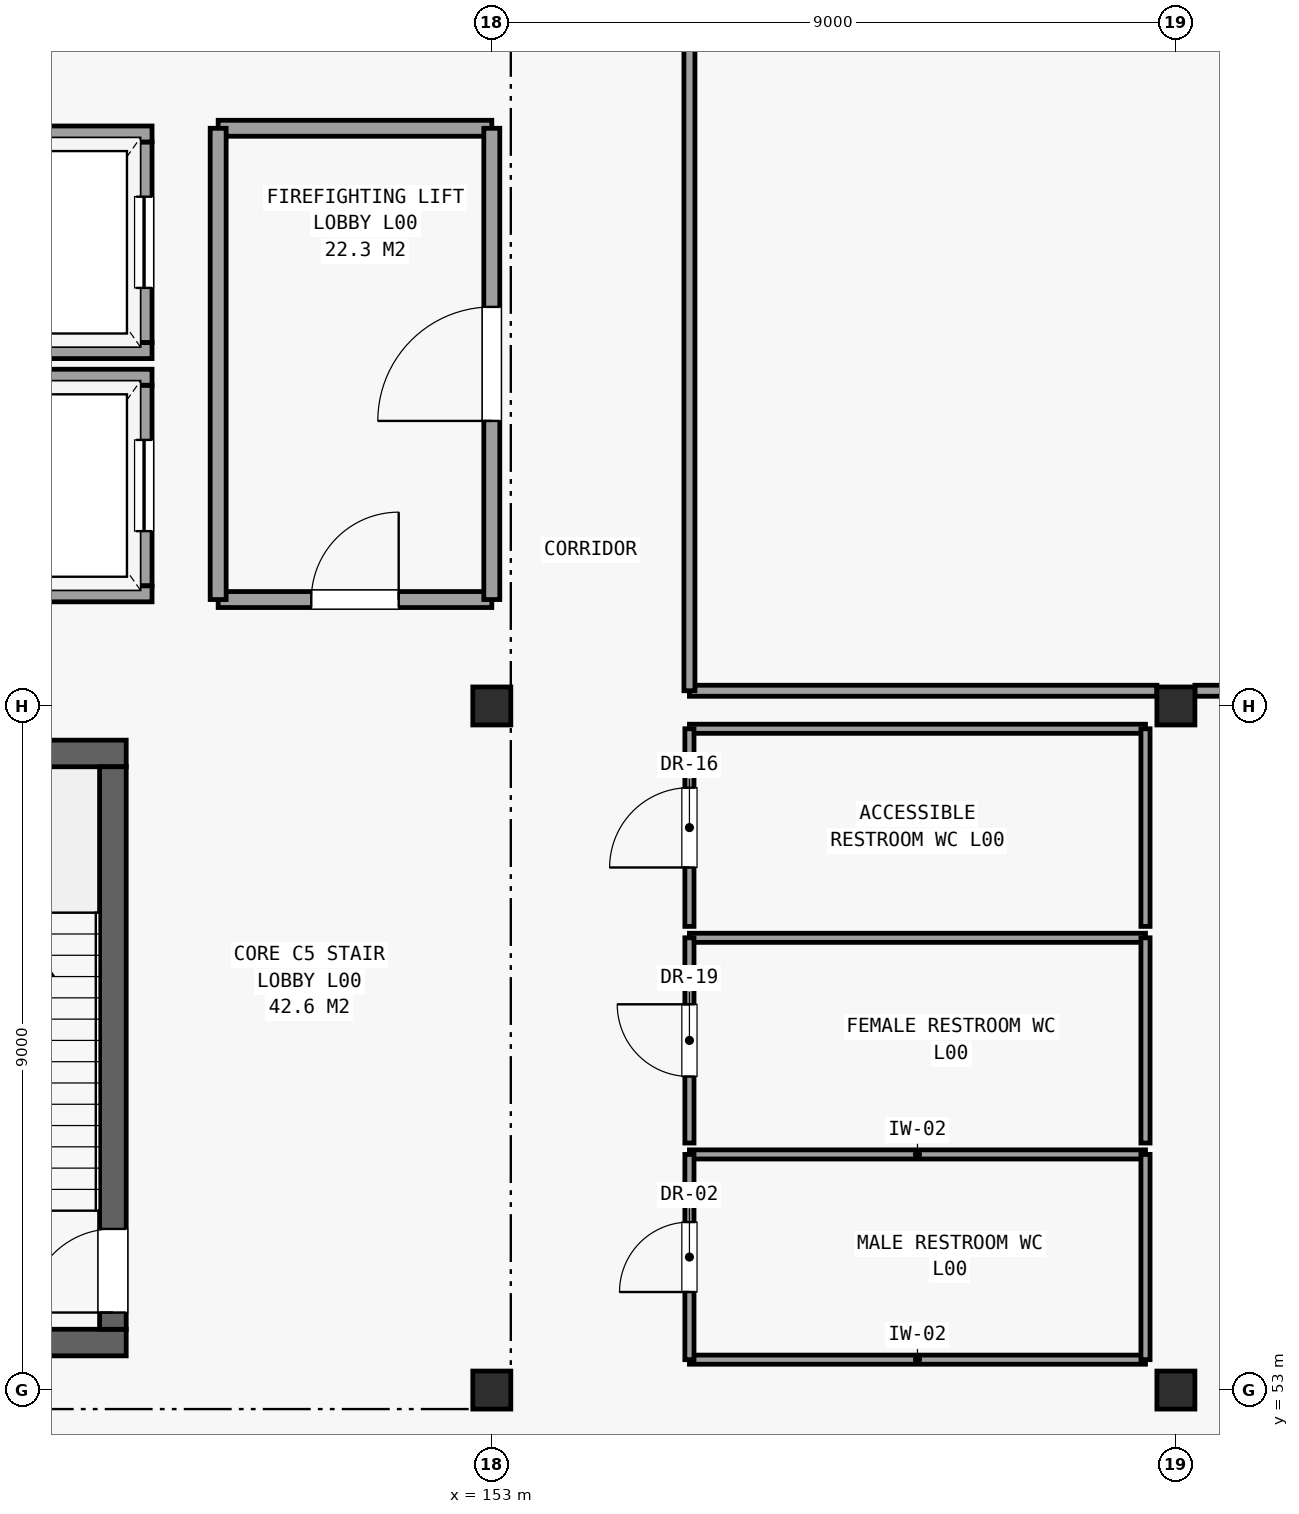
"""IFC4 building model, lengths in metres.
Left out: names, types, materials, properties, quantities, classifications, styles, units other than length and angle.
Written with IfcOpenShell. Run it as: python <this file> out.ifc"""

import sys

from ifc_helpers import new_model, si_unit, direction, frame, frame_2d, origin, origin_2d, place, context, subcontext, project, spatial, rectangle, hollow_rectangle, extrude, element, fill, save


model = new_model("IFC4")
c1 = context("Model", 3, precision=1e-05, world=origin(), true_north=direction((0.0, 1.0)))
c2 = subcontext(c1, "Body", "Model", "MODEL_VIEW")
j1 = project(units=[si_unit("LENGTHUNIT", "METRE"), si_unit("PLANEANGLEUNIT", "RADIAN")], contexts=[c1])
p1 = place(None, origin())
s1 = spatial("IfcSite", under=j1, at=p1, CompositionType="ELEMENT")
p2 = place(p1, origin())
s2 = spatial("IfcBuilding", under=s1, at=p2, CompositionType="ELEMENT")
p3 = place(p2, origin())
s3 = spatial("IfcBuildingStorey", under=s2, at=p3, CompositionType="ELEMENT", Elevation=0.0)
for number, where, z_axis, x_axis in (
    (1, (153.0, 53.0, 0.0), (0.0, 0.0, 1.0), (1.0, 0.0, 0.0)),
    (2, (153.0, 62.0, 0.0), (0.0, 0.0, 1.0), (1.0, 0.0, 0.0)),
    (3, (162.0, 53.0, 0.0), (0.0, 0.0, 1.0), (1.0, 0.0, 0.0)),
    (4, (162.0, 62.0, 0.0), (0.0, 0.0, 1.0), (1.0, 0.0, 0.0)),
):
    element("IfcColumn", number, at=place(p3, frame(where, z_axis=z_axis, x_axis=x_axis)), inside=s3, PredefinedType="COLUMN", context=c2, shape_type="SweptSolid", body=[
        extrude(hollow_rectangle(XDim=0.5, YDim=0.5, WallThickness=0.025, at=origin_2d()), origin(), (0.0, 0.0, 1.0), 5.1),
    ])
for number, where, z_axis, x_axis in (
    (5, (144.21, 53.625, 0.0), (0.0, 0.0, 1.0), (1.0, 0.0, 0.0)),
    (6, (144.21, 61.375, 0.0), (0.0, 0.0, 1.0), (1.0, 0.0, 0.0)),
):
    element("IfcWall", number, at=place(p3, frame(where, z_axis=z_axis, x_axis=x_axis)), inside=s3, PredefinedType="SHEAR", context=c2, shape_type="SweptSolid", body=[
        extrude(rectangle(XDim=3.98, YDim=0.35, at=frame_2d((1.99, 0.0))), origin(), (0.0, 0.0, 1.0), 4.84),
    ])
p4 = place(p3, frame((148.015, 53.8, 0.0), z_axis=(0.0, 0.0, 1.0), x_axis=(0.0, 1.0, 0.0)))
e7 = element("IfcWall", 7, at=p4, inside=s3, PredefinedType="SHEAR", context=c2, shape_type="SweptSolid", body=[
    extrude(rectangle(XDim=7.4, YDim=0.35, at=frame_2d((3.7, 0.0))), origin(), (0.0, 0.0, 1.0), 4.84),
])
p5 = place(p4, frame((0.22, 0.0, 0.0)))
e8 = element("IfcOpeningElement", 8, at=p5, cuts=e7, PredefinedType="OPENING", context=c2, shape_type="SweptSolid", body=[
    extrude(rectangle(XDim=1.1, YDim=2.15, at=frame_2d((0.55, 1.075))), frame((0.0, 0.186, 0.0), z_axis=(0.0, -1.0, 0.0), x_axis=(1.0, 0.0, 0.0)), (0.0, 0.0, 1.0), 0.372),
])
p6 = place(p3, frame((148.425, 63.58, 0.0), z_axis=(0.0, 0.0, 1.0), x_axis=(0.0, 1.0, 0.0)))
e9 = element("IfcWall", 9, at=p6, inside=s3, PredefinedType="PARTITIONING", context=c2, shape_type="SweptSolid", body=[
    extrude(rectangle(XDim=2.64, YDim=0.21, at=frame_2d((1.32, 0.0))), origin(), (0.0, 0.0, 1.0), 4.84),
])
p7 = place(p6, frame((0.72, 0.0, 0.0)))
e10 = element("IfcOpeningElement", 10, at=p7, cuts=e9, PredefinedType="OPENING", context=c2, shape_type="SweptSolid", body=[
    extrude(rectangle(XDim=1.2, YDim=2.2, at=frame_2d((0.6, 1.1))), frame((0.0, 0.116, 0.0), z_axis=(0.0, -1.0, 0.0), x_axis=(1.0, 0.0, 0.0)), (0.0, 0.0, 1.0), 0.232),
])
for number, where, z_axis, x_axis in (
    (11, (146.27, 63.475, 0.0), (0.0, 0.0, 1.0), (1.0, 0.0, 0.0)),
    (12, (146.27, 66.325, 0.0), (0.0, 0.0, 1.0), (1.0, 0.0, 0.0)),
):
    element("IfcWall", number, at=place(p3, frame(where, z_axis=z_axis, x_axis=x_axis)), inside=s3, PredefinedType="PARTITIONING", context=c2, shape_type="SweptSolid", body=[
        extrude(rectangle(XDim=2.26, YDim=0.21, at=frame_2d((1.13, 0.0))), origin(), (0.0, 0.0, 1.0), 4.84),
    ])
p8 = place(p3, frame((148.425, 66.78, 0.0), z_axis=(0.0, 0.0, 1.0), x_axis=(0.0, 1.0, 0.0)))
e13 = element("IfcWall", 13, at=p8, inside=s3, PredefinedType="PARTITIONING", context=c2, shape_type="SweptSolid", body=[
    extrude(rectangle(XDim=2.64, YDim=0.21, at=frame_2d((1.32, 0.0))), origin(), (0.0, 0.0, 1.0), 4.84),
])
p9 = place(p8, frame((0.72, 0.0, 0.0)))
e14 = element("IfcOpeningElement", 14, at=p9, cuts=e13, PredefinedType="OPENING", context=c2, shape_type="SweptSolid", body=[
    extrude(rectangle(XDim=1.2, YDim=2.2, at=frame_2d((0.6, 1.1))), frame((0.0, 0.116, 0.0), z_axis=(0.0, -1.0, 0.0), x_axis=(1.0, 0.0, 0.0)), (0.0, 0.0, 1.0), 0.232),
])
for number, where, z_axis, x_axis in (
    (15, (146.27, 66.675, 0.0), (0.0, 0.0, 1.0), (1.0, 0.0, 0.0)),
    (16, (146.27, 69.525, 0.0), (0.0, 0.0, 1.0), (1.0, 0.0, 0.0)),
):
    element("IfcWall", number, at=place(p3, frame(where, z_axis=z_axis, x_axis=x_axis)), inside=s3, PredefinedType="PARTITIONING", context=c2, shape_type="SweptSolid", body=[
        extrude(rectangle(XDim=2.26, YDim=0.21, at=frame_2d((1.13, 0.0))), origin(), (0.0, 0.0, 1.0), 4.84),
    ])
p10 = place(p3, frame((149.4, 63.4, 0.0), z_axis=(0.0, 0.0, 1.0), x_axis=(1.0, 0.0, 0.0)))
e17 = element("IfcWall", 17, at=p10, inside=s3, PredefinedType="PARTITIONING", context=c2, shape_type="SweptSolid", body=[
    extrude(rectangle(XDim=3.6, YDim=0.21, at=frame_2d((1.8, 0.0))), origin(), (0.0, 0.0, 1.0), 4.19),
])
p11 = place(p10, frame((1.225, 0.0, 0.0)))
e18 = element("IfcOpeningElement", 18, at=p11, cuts=e17, PredefinedType="OPENING", context=c2, shape_type="SweptSolid", body=[
    extrude(rectangle(XDim=1.15, YDim=2.2, at=frame_2d((0.575, 1.1))), frame((0.0, 0.116, 0.0), z_axis=(0.0, -1.0, 0.0), x_axis=(1.0, 0.0, 0.0)), (0.0, 0.0, 1.0), 0.232),
])
p12 = place(p3, frame((149.4, 69.6, 0.0), z_axis=(0.0, 0.0, 1.0), x_axis=(1.0, 0.0, 0.0)))
e19 = element("IfcWall", 19, at=p12, inside=s3, PredefinedType="PARTITIONING", context=c2, shape_type="SweptSolid", body=[
    extrude(rectangle(XDim=3.6, YDim=0.21, at=frame_2d((1.8, 0.0))), origin(), (0.0, 0.0, 1.0), 4.19),
])
p13 = place(p3, frame((149.4, 63.4, 0.0), z_axis=(0.0, 0.0, 1.0), x_axis=(0.0, 1.0, 0.0)))
e20 = element("IfcWall", 20, at=p13, inside=s3, PredefinedType="PARTITIONING", context=c2, shape_type="SweptSolid", body=[
    extrude(rectangle(XDim=6.2, YDim=0.21, at=frame_2d((3.1, 0.0))), origin(), (0.0, 0.0, 1.0), 4.84),
])
p14 = place(p3, frame((153.0, 63.4, 0.0), z_axis=(0.0, 0.0, 1.0), x_axis=(0.0, 1.0, 0.0)))
e21 = element("IfcWall", 21, at=p14, inside=s3, PredefinedType="PARTITIONING", context=c2, shape_type="SweptSolid", body=[
    extrude(rectangle(XDim=6.2, YDim=0.21, at=frame_2d((3.1, 0.0))), origin(), (0.0, 0.0, 1.0), 4.19),
])
p15 = place(p14, frame((2.35, 0.0, 0.0)))
e22 = element("IfcOpeningElement", 22, at=p15, cuts=e21, PredefinedType="OPENING", context=c2, shape_type="SweptSolid", body=[
    extrude(rectangle(XDim=1.5, YDim=2.25, at=frame_2d((0.75, 1.125))), frame((0.0, 0.116, 0.0), z_axis=(0.0, -1.0, 0.0), x_axis=(1.0, 0.0, 0.0)), (0.0, 0.0, 1.0), 0.232),
])
for number, where, z_axis, x_axis in (
    (23, (155.6, 53.4, 0.0), (0.0, 0.0, 1.0), (1.0, 0.0, 0.0)),
    (24, (155.6, 56.1, 0.0), (0.0, 0.0, 1.0), (1.0, 0.0, 0.0)),
):
    element("IfcWall", number, at=place(p3, frame(where, z_axis=z_axis, x_axis=x_axis)), inside=s3, PredefinedType="PARTITIONING", context=c2, shape_type="SweptSolid", body=[
        extrude(rectangle(XDim=6.0, YDim=0.12, at=frame_2d((3.0, 0.0))), origin(), (0.0, 0.0, 1.0), 4.84),
    ])
p16 = place(p3, frame((155.6, 53.4, 0.0), z_axis=(0.0, 0.0, 1.0), x_axis=(0.0, 1.0, 0.0)))
e25 = element("IfcWall", 25, at=p16, inside=s3, PredefinedType="PARTITIONING", context=c2, shape_type="SweptSolid", body=[
    extrude(rectangle(XDim=2.7, YDim=0.12, at=frame_2d((1.35, 0.0))), origin(), (0.0, 0.0, 1.0), 4.84),
])
p17 = place(p16, frame((0.89, 0.0, 0.0)))
e26 = element("IfcOpeningElement", 26, at=p17, cuts=e25, PredefinedType="OPENING", context=c2, shape_type="SweptSolid", body=[
    extrude(rectangle(XDim=0.92, YDim=2.1, at=frame_2d((0.46, 1.05))), frame((0.0, 0.071, 0.0), z_axis=(0.0, -1.0, 0.0), x_axis=(1.0, 0.0, 0.0)), (0.0, 0.0, 1.0), 0.142),
])
p18 = place(p3, frame((161.6, 53.4, 0.0), z_axis=(0.0, 0.0, 1.0), x_axis=(0.0, 1.0, 0.0)))
e27 = element("IfcWall", 27, at=p18, inside=s3, PredefinedType="PARTITIONING", context=c2, shape_type="SweptSolid", body=[
    extrude(rectangle(XDim=2.7, YDim=0.12, at=frame_2d((1.35, 0.0))), origin(), (0.0, 0.0, 1.0), 4.84),
])
p19 = place(p3, frame((155.6, 58.95, 0.0), z_axis=(0.0, 0.0, 1.0), x_axis=(1.0, 0.0, 0.0)))
e28 = element("IfcWall", 28, at=p19, inside=s3, PredefinedType="PARTITIONING", context=c2, shape_type="SweptSolid", body=[
    extrude(rectangle(XDim=6.0, YDim=0.12, at=frame_2d((3.0, 0.0))), origin(), (0.0, 0.0, 1.0), 4.84),
])
p20 = place(p3, frame((155.6, 56.25, 0.0), z_axis=(0.0, 0.0, 1.0), x_axis=(0.0, 1.0, 0.0)))
e29 = element("IfcWall", 29, at=p20, inside=s3, PredefinedType="PARTITIONING", context=c2, shape_type="SweptSolid", body=[
    extrude(rectangle(XDim=2.7, YDim=0.12, at=frame_2d((1.35, 0.0))), origin(), (0.0, 0.0, 1.0), 4.44),
])
p21 = place(p20, frame((0.875, 0.0, 0.0)))
e30 = element("IfcOpeningElement", 30, at=p21, cuts=e29, PredefinedType="OPENING", context=c2, shape_type="SweptSolid", body=[
    extrude(rectangle(XDim=0.95, YDim=2.15, at=frame_2d((0.475, 1.075))), frame((0.0, 0.071, 0.0), z_axis=(0.0, -1.0, 0.0), x_axis=(1.0, 0.0, 0.0)), (0.0, 0.0, 1.0), 0.142),
])
p22 = place(p3, frame((161.6, 56.25, 0.0), z_axis=(0.0, 0.0, 1.0), x_axis=(0.0, 1.0, 0.0)))
e31 = element("IfcWall", 31, at=p22, inside=s3, PredefinedType="PARTITIONING", context=c2, shape_type="SweptSolid", body=[
    extrude(rectangle(XDim=2.7, YDim=0.12, at=frame_2d((1.35, 0.0))), origin(), (0.0, 0.0, 1.0), 4.44),
])
p23 = place(p3, frame((155.6, 61.7, 0.0), z_axis=(0.0, 0.0, 1.0), x_axis=(1.0, 0.0, 0.0)))
e32 = element("IfcWall", 32, at=p23, inside=s3, PredefinedType="PARTITIONING", context=c2, shape_type="SweptSolid", body=[
    extrude(rectangle(XDim=6.0, YDim=0.12, at=frame_2d((3.0, 0.0))), origin(), (0.0, 0.0, 1.0), 4.252),
])
p24 = place(p3, frame((155.6, 59.1, 0.0), z_axis=(0.0, 0.0, 1.0), x_axis=(0.0, 1.0, 0.0)))
e33 = element("IfcWall", 33, at=p24, inside=s3, PredefinedType="PARTITIONING", context=c2, shape_type="SweptSolid", body=[
    extrude(rectangle(XDim=2.6, YDim=0.12, at=frame_2d((1.3, 0.0))), origin(), (0.0, 0.0, 1.0), 4.252),
])
p25 = place(p24, frame((0.775, 0.0, 0.0)))
e34 = element("IfcOpeningElement", 34, at=p25, cuts=e33, PredefinedType="OPENING", context=c2, shape_type="SweptSolid", body=[
    extrude(rectangle(XDim=1.05, YDim=2.2, at=frame_2d((0.525, 1.1))), frame((0.0, 0.071, 0.0), z_axis=(0.0, -1.0, 0.0), x_axis=(1.0, 0.0, 0.0)), (0.0, 0.0, 1.0), 0.142),
])
p26 = place(p3, frame((161.6, 59.1, 0.0), z_axis=(0.0, 0.0, 1.0), x_axis=(0.0, 1.0, 0.0)))
e35 = element("IfcWall", 35, at=p26, inside=s3, PredefinedType="PARTITIONING", context=c2, shape_type="SweptSolid", body=[
    extrude(rectangle(XDim=2.6, YDim=0.12, at=frame_2d((1.3, 0.0))), origin(), (0.0, 0.0, 1.0), 4.252),
])
p27 = place(p3, frame((155.6, 62.2, 0.0), z_axis=(0.0, 0.0, 1.0), x_axis=(1.0, 0.0, 0.0)))
e36 = element("IfcWall", 36, at=p27, inside=s3, PredefinedType="PARTITIONING", context=c2, shape_type="SweptSolid", body=[
    extrude(rectangle(XDim=6.15, YDim=0.145, at=frame_2d((3.075, 0.0))), origin(), (0.0, 0.0, 1.0), 4.19),
])
p28 = place(p3, frame((162.25, 62.2, 0.0), z_axis=(0.0, 0.0, 1.0), x_axis=(1.0, 0.0, 0.0)))
e37 = element("IfcWall", 37, at=p28, inside=s3, PredefinedType="PARTITIONING", context=c2, shape_type="SweptSolid", body=[
    extrude(rectangle(XDim=8.5, YDim=0.145, at=frame_2d((4.25, 0.0))), origin(), (0.0, 0.0, 1.0), 4.19),
])
p29 = place(p3, frame((155.6, 62.2, 0.0), z_axis=(0.0, 0.0, 1.0), x_axis=(0.0, 1.0, 0.0)))
e38 = element("IfcWall", 38, at=p29, inside=s3, PredefinedType="PARTITIONING", context=c2, shape_type="SweptSolid", body=[
    extrude(rectangle(XDim=17.6, YDim=0.145, at=frame_2d((8.8, 0.0))), origin(), (0.0, 0.0, 1.0), 4.252),
])
p30 = place(p29, frame((12.39, 0.0, 0.0)))
e39 = element("IfcOpeningElement", 39, at=p30, cuts=e38, PredefinedType="OPENING", context=c2, shape_type="SweptSolid", body=[
    extrude(rectangle(XDim=1.82, YDim=2.45, at=frame_2d((0.91, 1.225))), frame((0.0, 0.083, 0.0), z_axis=(0.0, -1.0, 0.0), x_axis=(1.0, 0.0, 0.0)), (0.0, 0.0, 1.0), 0.167),
])
p31 = place(p5, origin())
e40 = element("IfcDoor", 40, at=p31, inside=s3, OperationType="SINGLE_SWING_LEFT", PredefinedType="DOOR", context=c2, shape_type="SweptSolid", body=[
    extrude(rectangle(XDim=1.1, YDim=2.15, at=frame_2d((0.55, 1.075))), frame((0.0, 0.025, 0.0), z_axis=(0.0, -1.0, 0.0), x_axis=(1.0, 0.0, 0.0)), (0.0, 0.0, 1.0), 0.05),
])
fill(e8, e40)
p32 = place(p7, origin())
e41 = element("IfcDoor", 41, at=p32, inside=s3, OperationType="SLIDING_TO_LEFT", PredefinedType="DOOR", context=c2, shape_type="SweptSolid", body=[
    extrude(rectangle(XDim=1.2, YDim=2.2, at=frame_2d((0.6, 1.1))), frame((0.0, 0.025, 0.0), z_axis=(0.0, -1.0, 0.0), x_axis=(1.0, 0.0, 0.0)), (0.0, 0.0, 1.0), 0.05),
])
fill(e10, e41)
p33 = place(p9, origin())
e42 = element("IfcDoor", 42, at=p33, inside=s3, OperationType="SLIDING_TO_RIGHT", PredefinedType="DOOR", context=c2, shape_type="SweptSolid", body=[
    extrude(rectangle(XDim=1.2, YDim=2.2, at=frame_2d((0.6, 1.1))), frame((0.0, 0.025, 0.0), z_axis=(0.0, -1.0, 0.0), x_axis=(1.0, 0.0, 0.0)), (0.0, 0.0, 1.0), 0.05),
])
fill(e14, e42)
p34 = place(p11, origin())
e43 = element("IfcDoor", 43, at=p34, inside=s3, OperationType="SINGLE_SWING_RIGHT", PredefinedType="DOOR", context=c2, shape_type="SweptSolid", body=[
    extrude(rectangle(XDim=1.15, YDim=2.2, at=frame_2d((0.575, 1.1))), frame((0.0, 0.025, 0.0), z_axis=(0.0, -1.0, 0.0), x_axis=(1.0, 0.0, 0.0)), (0.0, 0.0, 1.0), 0.05),
])
fill(e18, e43)
p35 = place(p15, origin())
e44 = element("IfcDoor", 44, at=p35, inside=s3, OperationType="SINGLE_SWING_LEFT", PredefinedType="DOOR", context=c2, shape_type="SweptSolid", body=[
    extrude(rectangle(XDim=1.5, YDim=2.25, at=frame_2d((0.75, 1.125))), frame((0.0, 0.025, 0.0), z_axis=(0.0, -1.0, 0.0), x_axis=(1.0, 0.0, 0.0)), (0.0, 0.0, 1.0), 0.05),
])
fill(e22, e44)
p36 = place(p17, origin())
e45 = element("IfcDoor", 45, at=p36, inside=s3, OperationType="SINGLE_SWING_LEFT", PredefinedType="DOOR", context=c2, shape_type="SweptSolid", body=[
    extrude(rectangle(XDim=0.92, YDim=2.1, at=frame_2d((0.46, 1.05))), frame((0.0, 0.025, 0.0), z_axis=(0.0, -1.0, 0.0), x_axis=(1.0, 0.0, 0.0)), (0.0, 0.0, 1.0), 0.05),
])
fill(e26, e45)
p37 = place(p21, origin())
e46 = element("IfcDoor", 46, at=p37, inside=s3, OperationType="SINGLE_SWING_RIGHT", PredefinedType="DOOR", context=c2, shape_type="SweptSolid", body=[
    extrude(rectangle(XDim=0.95, YDim=2.15, at=frame_2d((0.475, 1.075))), frame((0.0, 0.025, 0.0), z_axis=(0.0, -1.0, 0.0), x_axis=(1.0, 0.0, 0.0)), (0.0, 0.0, 1.0), 0.05),
])
fill(e30, e46)
p38 = place(p25, origin())
e47 = element("IfcDoor", 47, at=p38, inside=s3, OperationType="SINGLE_SWING_LEFT", PredefinedType="DOOR", context=c2, shape_type="SweptSolid", body=[
    extrude(rectangle(XDim=1.05, YDim=2.2, at=frame_2d((0.525, 1.1))), frame((0.0, 0.025, 0.0), z_axis=(0.0, -1.0, 0.0), x_axis=(1.0, 0.0, 0.0)), (0.0, 0.0, 1.0), 0.05),
])
fill(e34, e47)
save(model, sys.argv[1])
